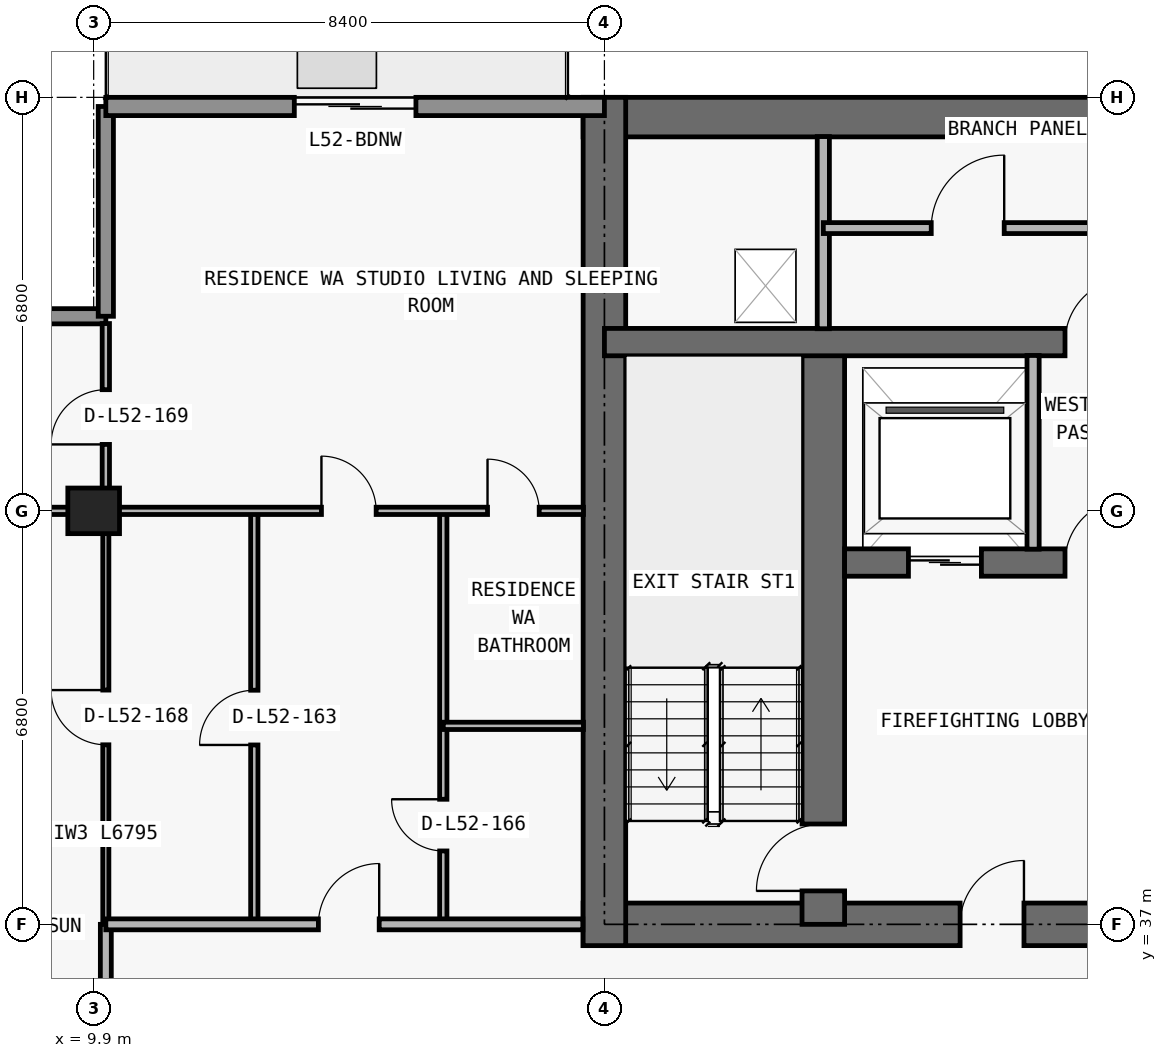
"""IFC4 building model, lengths in metres.
Left out: names, types, materials, properties, quantities, classifications, styles, units other than length and angle.
Written with IfcOpenShell. Run it as: python <this file> out.ifc"""

import sys

from ifc_helpers import new_model, si_unit, direction, frame, frame_2d, origin, origin_2d, place, context, subcontext, project, spatial, rectangle, extrude, element, fill, save


model = new_model("IFC4")
c1 = context("Model", 3, precision=1e-05, world=origin(), true_north=direction((0.0, 1.0)))
c2 = subcontext(c1, "Body", "Model", "MODEL_VIEW")
j1 = project(units=[si_unit("LENGTHUNIT", "METRE"), si_unit("PLANEANGLEUNIT", "RADIAN")], contexts=[c1])
p1 = place(None, origin())
s1 = spatial("IfcSite", under=j1, at=p1, CompositionType="ELEMENT")
p2 = place(p1, origin())
s2 = spatial("IfcBuilding", under=s1, at=p2, CompositionType="ELEMENT")
p3 = place(p2, frame((0.0, 0.0, 188.4)))
s3 = spatial("IfcBuildingStorey", under=s2, at=p3, CompositionType="ELEMENT", Elevation=188.4)
p4 = place(p3, frame((9.9, 43.8, 0.0), z_axis=(0.0, 0.0, 1.0), x_axis=(1.0, 0.0, 0.0)))
e1 = element("IfcColumn", 1, at=p4, inside=s3, PredefinedType="COLUMN", context=c2, shape_type="SweptSolid", body=[
    extrude(rectangle(XDim=0.85, YDim=0.75, at=origin_2d()), origin(), (0.0, 0.0, 1.0), 3.05),
])
p5 = place(p3, frame((17.95, 37.0, 0.0), z_axis=(0.0, 0.0, 1.0), x_axis=(1.0, 0.0, 0.0)))
e2 = element("IfcWall", 2, at=p5, inside=s3, PredefinedType="SHEAR", context=c2, shape_type="SweptSolid", body=[
    extrude(rectangle(XDim=41.9, YDim=0.7, at=frame_2d((20.95, 0.0))), origin(), (0.0, 0.0, 1.0), 3.05),
])
p6 = place(p5, frame((14.35, 0.0, 0.0)))
e3 = element("IfcOpeningElement", 3, at=p6, cuts=e2, PredefinedType="OPENING", context=c2, shape_type="SweptSolid", body=[
    extrude(rectangle(XDim=1.1, YDim=2.15, at=frame_2d((0.55, 1.075))), frame((0.0, 0.36, 0.0), z_axis=(0.0, -1.0, 0.0), x_axis=(1.0, 0.0, 0.0)), (0.0, 0.0, 1.0), 0.72),
])
p7 = place(p5, frame((6.2, 0.0, 0.0)))
e4 = element("IfcOpeningElement", 4, at=p7, cuts=e2, PredefinedType="OPENING", context=c2, shape_type="SweptSolid", body=[
    extrude(rectangle(XDim=1.05, YDim=2.15, at=frame_2d((0.525, 1.075))), frame((0.0, 0.36, 0.0), z_axis=(0.0, -1.0, 0.0), x_axis=(1.0, 0.0, 0.0)), (0.0, 0.0, 1.0), 0.72),
])
p8 = place(p5, frame((34.7, 0.0, 0.0)))
e5 = element("IfcOpeningElement", 5, at=p8, cuts=e2, PredefinedType="OPENING", context=c2, shape_type="SweptSolid", body=[
    extrude(rectangle(XDim=1.05, YDim=2.15, at=frame_2d((0.525, 1.075))), frame((0.0, 0.36, 0.0), z_axis=(0.0, -1.0, 0.0), x_axis=(1.0, 0.0, 0.0)), (0.0, 0.0, 1.0), 0.72),
])
p9 = place(p5, frame((10.812, 0.0, 0.0)))
e6 = element("IfcOpeningElement", 6, at=p9, cuts=e2, PredefinedType="OPENING", context=c2, shape_type="SweptSolid", body=[
    extrude(rectangle(XDim=1.05, YDim=2.15, at=frame_2d((0.525, 1.075))), frame((0.0, 0.36, 0.0), z_axis=(0.0, -1.0, 0.0), x_axis=(1.0, 0.0, 0.0)), (0.0, 0.0, 1.0), 0.72),
])
p10 = place(p5, frame((24.05, 0.0, 0.0)))
e7 = element("IfcOpeningElement", 7, at=p10, cuts=e2, PredefinedType="OPENING", context=c2, shape_type="SweptSolid", body=[
    extrude(rectangle(XDim=1.05, YDim=2.15, at=frame_2d((0.525, 1.075))), frame((0.0, 0.36, 0.0), z_axis=(0.0, -1.0, 0.0), x_axis=(1.0, 0.0, 0.0)), (0.0, 0.0, 1.0), 0.72),
])
p11 = place(p3, frame((17.95, 50.275, 0.0), z_axis=(0.0, 0.0, 1.0), x_axis=(1.0, 0.0, 0.0)))
e8 = element("IfcWall", 8, at=p11, inside=s3, PredefinedType="SHEAR", context=c2, shape_type="SweptSolid", body=[
    extrude(rectangle(XDim=41.9, YDim=0.65, at=frame_2d((20.95, 0.0))), origin(), (0.0, 0.0, 1.0), 3.05),
])
p12 = place(p3, frame((18.3, 36.65, 0.0), z_axis=(0.0, 0.0, 1.0), x_axis=(0.0, 1.0, 0.0)))
e9 = element("IfcWall", 9, at=p12, inside=s3, PredefinedType="SHEAR", context=c2, shape_type="SweptSolid", body=[
    extrude(rectangle(XDim=13.95, YDim=0.7, at=frame_2d((6.975, 0.0))), origin(), (0.0, 0.0, 1.0), 3.05),
])
p13 = place(p3, frame((21.9, 37.0, 0.0), z_axis=(0.0, 0.0, 1.0), x_axis=(0.0, 1.0, 0.0)))
e10 = element("IfcWall", 10, at=p13, inside=s3, PredefinedType="SHEAR", context=c2, shape_type="SweptSolid", body=[
    extrude(rectangle(XDim=9.575, YDim=0.7, at=frame_2d((4.788, 0.0))), origin(), (0.0, 0.0, 1.0), 3.05),
])
p14 = place(p13, frame((0.55, 0.0, 0.0)))
e11 = element("IfcOpeningElement", 11, at=p14, cuts=e10, PredefinedType="OPENING", context=c2, shape_type="SweptSolid", body=[
    extrude(rectangle(XDim=1.1, YDim=2.15, at=frame_2d((0.55, 1.075))), frame((0.0, 0.36, 0.0), z_axis=(0.0, -1.0, 0.0), x_axis=(1.0, 0.0, 0.0)), (0.0, 0.0, 1.0), 0.72),
])
p15 = place(p3, frame((22.25, 42.95, 0.0), z_axis=(0.0, 0.0, 1.0), x_axis=(1.0, 0.0, 0.0)))
e12 = element("IfcWall", 12, at=p15, inside=s3, PredefinedType="SHEAR", context=c2, shape_type="SweptSolid", body=[
    extrude(rectangle(XDim=33.3, YDim=0.45, at=frame_2d((16.65, 0.0))), origin(), (0.0, 0.0, 1.0), 3.05),
])
p16 = place(p15, frame((1.05, 0.0, 0.0)))
e13 = element("IfcOpeningElement", 13, at=p16, cuts=e12, PredefinedType="OPENING", context=c2, shape_type="SweptSolid", body=[
    extrude(rectangle(XDim=1.2, YDim=2.2, at=frame_2d((0.6, 1.1))), frame((0.0, 0.235, 0.0), z_axis=(0.0, -1.0, 0.0), x_axis=(1.0, 0.0, 0.0)), (0.0, 0.0, 1.0), 0.47),
])
p17 = place(p15, frame((31.05, 0.0, 0.0)))
e14 = element("IfcOpeningElement", 14, at=p17, cuts=e12, PredefinedType="OPENING", context=c2, shape_type="SweptSolid", body=[
    extrude(rectangle(XDim=1.2, YDim=2.2, at=frame_2d((0.6, 1.1))), frame((0.0, 0.235, 0.0), z_axis=(0.0, -1.0, 0.0), x_axis=(1.0, 0.0, 0.0)), (0.0, 0.0, 1.0), 0.47),
])
p18 = place(p15, frame((26.45, 0.0, 0.0)))
e15 = element("IfcOpeningElement", 15, at=p18, cuts=e12, PredefinedType="OPENING", context=c2, shape_type="SweptSolid", body=[
    extrude(rectangle(XDim=1.1, YDim=2.2, at=frame_2d((0.55, 1.1))), frame((0.0, 0.235, 0.0), z_axis=(0.0, -1.0, 0.0), x_axis=(1.0, 0.0, 0.0)), (0.0, 0.0, 1.0), 0.47),
])
p19 = place(p15, frame((5.95, 0.0, 0.0)))
e16 = element("IfcOpeningElement", 16, at=p19, cuts=e12, PredefinedType="OPENING", context=c2, shape_type="SweptSolid", body=[
    extrude(rectangle(XDim=1.1, YDim=2.2, at=frame_2d((0.55, 1.1))), frame((0.0, 0.235, 0.0), z_axis=(0.0, -1.0, 0.0), x_axis=(1.0, 0.0, 0.0)), (0.0, 0.0, 1.0), 0.47),
])
p20 = place(p15, frame((3.625, 0.0, 0.0)))
e17 = element("IfcOpeningElement", 17, at=p20, cuts=e12, PredefinedType="OPENING", context=c2, shape_type="SweptSolid", body=[
    extrude(rectangle(XDim=1.05, YDim=2.15, at=frame_2d((0.525, 1.075))), frame((0.0, 0.235, 0.0), z_axis=(0.0, -1.0, 0.0), x_axis=(1.0, 0.0, 0.0)), (0.0, 0.0, 1.0), 0.47),
])
p21 = place(p15, frame((28.675, 0.0, 0.0)))
e18 = element("IfcOpeningElement", 18, at=p21, cuts=e12, PredefinedType="OPENING", context=c2, shape_type="SweptSolid", body=[
    extrude(rectangle(XDim=1.05, YDim=2.15, at=frame_2d((0.525, 1.075))), frame((0.0, 0.235, 0.0), z_axis=(0.0, -1.0, 0.0), x_axis=(1.0, 0.0, 0.0)), (0.0, 0.0, 1.0), 0.47),
])
p22 = place(p15, frame((15.225, 0.0, 0.0)))
e19 = element("IfcOpeningElement", 19, at=p22, cuts=e12, PredefinedType="OPENING", context=c2, shape_type="SweptSolid", body=[
    extrude(rectangle(XDim=1.0, YDim=2.2, at=frame_2d((0.5, 1.1))), frame((0.0, 0.235, 0.0), z_axis=(0.0, -1.0, 0.0), x_axis=(1.0, 0.0, 0.0)), (0.0, 0.0, 1.0), 0.47),
])
p23 = place(p15, frame((21.975, 0.0, 0.0)))
e20 = element("IfcOpeningElement", 20, at=p23, cuts=e12, PredefinedType="OPENING", context=c2, shape_type="SweptSolid", body=[
    extrude(rectangle(XDim=1.0, YDim=2.2, at=frame_2d((0.5, 1.1))), frame((0.0, 0.235, 0.0), z_axis=(0.0, -1.0, 0.0), x_axis=(1.0, 0.0, 0.0)), (0.0, 0.0, 1.0), 0.47),
])
p24 = place(p3, frame((18.3, 46.575, 0.0), z_axis=(0.0, 0.0, 1.0), x_axis=(1.0, 0.0, 0.0)))
e21 = element("IfcWall", 21, at=p24, inside=s3, PredefinedType="SHEAR", context=c2, shape_type="SweptSolid", body=[
    extrude(rectangle(XDim=41.2, YDim=0.45, at=frame_2d((20.6, 0.0))), origin(), (0.0, 0.0, 1.0), 3.05),
])
p25 = place(p24, frame((7.575, 0.0, 0.0)))
e22 = element("IfcOpeningElement", 22, at=p25, cuts=e21, PredefinedType="OPENING", context=c2, shape_type="SweptSolid", body=[
    extrude(rectangle(XDim=1.05, YDim=2.15, at=frame_2d((0.525, 1.075))), frame((0.0, 0.235, 0.0), z_axis=(0.0, -1.0, 0.0), x_axis=(1.0, 0.0, 0.0)), (0.0, 0.0, 1.0), 0.47),
])
p26 = place(p24, frame((32.625, 0.0, 0.0)))
e23 = element("IfcOpeningElement", 23, at=p26, cuts=e21, PredefinedType="OPENING", context=c2, shape_type="SweptSolid", body=[
    extrude(rectangle(XDim=1.05, YDim=2.15, at=frame_2d((0.525, 1.075))), frame((0.0, 0.235, 0.0), z_axis=(0.0, -1.0, 0.0), x_axis=(1.0, 0.0, 0.0)), (0.0, 0.0, 1.0), 0.47),
])
p27 = place(p3, frame((6.25, 47.0, 0.0), z_axis=(0.0, 0.0, 1.0), x_axis=(1.0, 0.0, 0.0)))
e24 = element("IfcWall", 24, at=p27, inside=s3, PredefinedType="ELEMENTEDWALL", context=c2, shape_type="SweptSolid", body=[
    extrude(rectangle(XDim=3.85, YDim=0.25, at=frame_2d((1.925, 0.0))), origin(), (0.0, 0.0, 1.0), 3.05),
])
p28 = place(p3, frame((10.1, 47.0, 0.0), z_axis=(0.0, 0.0, 1.0), x_axis=(0.0, 1.0, 0.0)))
e25 = element("IfcWall", 25, at=p28, inside=s3, PredefinedType="ELEMENTEDWALL", context=c2, shape_type="SweptSolid", body=[
    extrude(rectangle(XDim=3.45, YDim=0.25, at=frame_2d((1.725, 0.0))), origin(), (0.0, 0.0, 1.0), 3.05),
])
p29 = place(p3, frame((10.1, 50.45, 0.0), z_axis=(0.0, 0.0, 1.0), x_axis=(1.0, 0.0, 0.0)))
e26 = element("IfcWall", 26, at=p29, inside=s3, PredefinedType="STANDARD", context=c2, shape_type="SweptSolid", body=[
    extrude(rectangle(XDim=8.2, YDim=0.3, at=frame_2d((4.1, 0.0))), origin(), (0.0, 0.0, 1.0), 3.05),
])
p30 = place(p29, frame((3.1, 0.0, 0.0)))
e27 = element("IfcOpeningElement", 27, at=p30, cuts=e26, PredefinedType="OPENING", context=c2, shape_type="SweptSolid", body=[
    extrude(rectangle(XDim=2.0, YDim=2.3, at=frame_2d((1.0, 1.15))), frame((0.0, 0.16, 0.0), z_axis=(0.0, -1.0, 0.0), x_axis=(1.0, 0.0, 0.0)), (0.0, 0.0, 1.0), 0.32),
])
p31 = place(p3, frame((10.1, 33.505, 0.0), z_axis=(0.0, 0.0, 1.0), x_axis=(0.0, 1.0, 0.0)))
e28 = element("IfcWall", 28, at=p31, inside=s3, PredefinedType="PARTITIONING", context=c2, shape_type="SweptSolid", body=[
    extrude(rectangle(XDim=3.495, YDim=0.18, at=frame_2d((1.748, 0.0))), origin(), (0.0, 0.0, 1.0), 2.263),
])
p32 = place(p3, frame((10.1, 37.005, 0.0), z_axis=(0.0, 0.0, 1.0), x_axis=(0.0, 1.0, 0.0)))
e29 = element("IfcWall", 29, at=p32, inside=s3, PredefinedType="MOVABLE", context=c2, shape_type="SweptSolid", body=[
    extrude(rectangle(XDim=6.795, YDim=0.1, at=frame_2d((3.397, 0.0))), origin(), (0.0, 0.0, 1.0), 2.263),
])
p33 = place(p32, frame((2.948, 0.0, 0.0)))
e30 = element("IfcOpeningElement", 30, at=p33, cuts=e29, PredefinedType="OPENING", context=c2, shape_type="SweptSolid", body=[
    extrude(rectangle(XDim=0.9, YDim=2.15, at=frame_2d((0.45, 1.075))), frame((0.0, 0.06, 0.0), z_axis=(0.0, -1.0, 0.0), x_axis=(1.0, 0.0, 0.0)), (0.0, 0.0, 1.0), 0.12),
])
p34 = place(p3, frame((10.1, 43.805, 0.0), z_axis=(0.0, 0.0, 1.0), x_axis=(0.0, 1.0, 0.0)))
e31 = element("IfcWall", 31, at=p34, inside=s3, PredefinedType="PARTITIONING", context=c2, shape_type="SweptSolid", body=[
    extrude(rectangle(XDim=3.075, YDim=0.12, at=frame_2d((1.538, 0.0))), origin(), (0.0, 0.0, 1.0), 3.05),
])
p35 = place(p34, frame((1.087, 0.0, 0.0)))
e32 = element("IfcOpeningElement", 32, at=p35, cuts=e31, PredefinedType="OPENING", context=c2, shape_type="SweptSolid", body=[
    extrude(rectangle(XDim=0.9, YDim=2.15, at=frame_2d((0.45, 1.075))), frame((0.0, 0.07, 0.0), z_axis=(0.0, -1.0, 0.0), x_axis=(1.0, 0.0, 0.0)), (0.0, 0.0, 1.0), 0.14),
])
p36 = place(p3, frame((12.542, 37.0, 0.0), z_axis=(0.0, 0.0, 1.0), x_axis=(0.0, 1.0, 0.0)))
e33 = element("IfcWall", 33, at=p36, inside=s3, PredefinedType="PARTITIONING", context=c2, shape_type="SweptSolid", body=[
    extrude(rectangle(XDim=6.8, YDim=0.12, at=frame_2d((3.4, 0.0))), origin(), (0.0, 0.0, 1.0), 2.578),
])
p37 = place(p36, frame((2.95, 0.0, 0.0)))
e34 = element("IfcOpeningElement", 34, at=p37, cuts=e33, PredefinedType="OPENING", context=c2, shape_type="SweptSolid", body=[
    extrude(rectangle(XDim=0.9, YDim=2.15, at=frame_2d((0.45, 1.075))), frame((0.0, 0.07, 0.0), z_axis=(0.0, -1.0, 0.0), x_axis=(1.0, 0.0, 0.0)), (0.0, 0.0, 1.0), 0.14),
])
p38 = place(p3, frame((15.65, 37.0, 0.0), z_axis=(0.0, 0.0, 1.0), x_axis=(0.0, 1.0, 0.0)))
e35 = element("IfcWall", 35, at=p38, inside=s3, PredefinedType="PARTITIONING", context=c2, shape_type="SweptSolid", body=[
    extrude(rectangle(XDim=6.8, YDim=0.12, at=frame_2d((3.4, 0.0))), origin(), (0.0, 0.0, 1.0), 2.679),
])
p39 = place(p38, frame((1.207, 0.0, 0.0)))
e36 = element("IfcOpeningElement", 36, at=p39, cuts=e35, PredefinedType="OPENING", context=c2, shape_type="SweptSolid", body=[
    extrude(rectangle(XDim=0.85, YDim=2.1, at=frame_2d((0.425, 1.05))), frame((0.0, 0.07, 0.0), z_axis=(0.0, -1.0, 0.0), x_axis=(1.0, 0.0, 0.0)), (0.0, 0.0, 1.0), 0.14),
])
p40 = place(p3, frame((21.9, 46.795, 0.0), z_axis=(0.0, 0.0, 1.0), x_axis=(0.0, 1.0, 0.0)))
e37 = element("IfcWall", 37, at=p40, inside=s3, PredefinedType="PARTITIONING", context=c2, shape_type="SweptSolid", body=[
    extrude(rectangle(XDim=3.16, YDim=0.2, at=frame_2d((1.58, 0.0))), origin(), (0.0, 0.0, 1.0), 3.05),
])
p41 = place(p3, frame((25.35, 43.17, 0.0), z_axis=(0.0, 0.0, 1.0), x_axis=(0.0, 1.0, 0.0)))
e38 = element("IfcWall", 38, at=p41, inside=s3, PredefinedType="PARTITIONING", context=c2, shape_type="SweptSolid", body=[
    extrude(rectangle(XDim=3.185, YDim=0.2, at=frame_2d((1.593, 0.0))), origin(), (0.0, 0.0, 1.0), 3.05),
])
p42 = place(p3, frame((10.1, 37.0, 0.0), z_axis=(0.0, 0.0, 1.0), x_axis=(1.0, 0.0, 0.0)))
e39 = element("IfcWall", 39, at=p42, inside=s3, PredefinedType="PARTITIONING", context=c2, shape_type="SweptSolid", body=[
    extrude(rectangle(XDim=7.845, YDim=0.18, at=frame_2d((3.922, 0.0))), origin(), (0.0, 0.0, 1.0), 3.05),
])
p43 = place(p42, frame((3.496, 0.0, 0.0)))
e40 = element("IfcOpeningElement", 40, at=p43, cuts=e39, PredefinedType="OPENING", context=c2, shape_type="SweptSolid", body=[
    extrude(rectangle(XDim=1.0, YDim=2.2, at=frame_2d((0.5, 1.1))), frame((0.0, 0.1, 0.0), z_axis=(0.0, -1.0, 0.0), x_axis=(1.0, 0.0, 0.0)), (0.0, 0.0, 1.0), 0.2),
])
p44 = place(p3, frame((15.65, 40.264, 0.0), z_axis=(0.0, 0.0, 1.0), x_axis=(1.0, 0.0, 0.0)))
e41 = element("IfcWall", 41, at=p44, inside=s3, PredefinedType="PARTITIONING", context=c2, shape_type="SweptSolid", body=[
    extrude(rectangle(XDim=2.305, YDim=0.12, at=frame_2d((1.153, 0.0))), origin(), (0.0, 0.0, 1.0), 3.05),
])
p45 = place(p3, frame((6.395, 43.8, 0.0), z_axis=(0.0, 0.0, 1.0), x_axis=(1.0, 0.0, 0.0)))
e42 = element("IfcWall", 42, at=p45, inside=s3, PredefinedType="PARTITIONING", context=c2, shape_type="SweptSolid", body=[
    extrude(rectangle(XDim=11.56, YDim=0.12, at=frame_2d((5.78, 0.0))), origin(), (0.0, 0.0, 1.0), 2.418),
])
p46 = place(p45, frame((7.251, 0.0, 0.0)))
e43 = element("IfcOpeningElement", 43, at=p46, cuts=e42, PredefinedType="OPENING", context=c2, shape_type="SweptSolid", body=[
    extrude(rectangle(XDim=0.9, YDim=2.15, at=frame_2d((0.45, 1.075))), frame((0.0, 0.07, 0.0), z_axis=(0.0, -1.0, 0.0), x_axis=(1.0, 0.0, 0.0)), (0.0, 0.0, 1.0), 0.14),
])
p47 = place(p45, frame((9.982, 0.0, 0.0)))
e44 = element("IfcOpeningElement", 44, at=p47, cuts=e42, PredefinedType="OPENING", context=c2, shape_type="SweptSolid", body=[
    extrude(rectangle(XDim=0.85, YDim=2.1, at=frame_2d((0.425, 1.05))), frame((0.0, 0.07, 0.0), z_axis=(0.0, -1.0, 0.0), x_axis=(1.0, 0.0, 0.0)), (0.0, 0.0, 1.0), 0.14),
])
p48 = place(p3, frame((21.9, 48.45, 0.0), z_axis=(0.0, 0.0, 1.0), x_axis=(1.0, 0.0, 0.0)))
e45 = element("IfcWall", 45, at=p48, inside=s3, PredefinedType="PARTITIONING", context=c2, shape_type="SweptSolid", body=[
    extrude(rectangle(XDim=4.75, YDim=0.18, at=frame_2d((2.375, 0.0))), origin(), (0.0, 0.0, 1.0), 3.05),
])
p49 = place(p48, frame((1.775, 0.0, 0.0)))
e46 = element("IfcOpeningElement", 46, at=p49, cuts=e45, PredefinedType="OPENING", context=c2, shape_type="SweptSolid", body=[
    extrude(rectangle(XDim=1.2, YDim=2.2, at=frame_2d((0.6, 1.1))), frame((0.0, 0.1, 0.0), z_axis=(0.0, -1.0, 0.0), x_axis=(1.0, 0.0, 0.0)), (0.0, 0.0, 1.0), 0.2),
])
p50 = place(p30, origin())
e47 = element("IfcDoor", 47, at=p50, inside=s3, OperationType="DOUBLE_DOOR_SLIDING", PredefinedType="DOOR", context=c2, shape_type="SweptSolid", body=[
    extrude(rectangle(XDim=2.0, YDim=2.3, at=frame_2d((1.0, 1.15))), frame((0.0, 0.025, 0.0), z_axis=(0.0, -1.0, 0.0), x_axis=(1.0, 0.0, 0.0)), (0.0, 0.0, 1.0), 0.05),
])
fill(e27, e47)
p51 = place(p16, origin())
e48 = element("IfcDoor", 48, at=p51, inside=s3, OperationType="DOUBLE_DOOR_SLIDING", PredefinedType="DOOR", context=c2, shape_type="SweptSolid", body=[
    extrude(rectangle(XDim=1.2, YDim=2.2, at=frame_2d((0.6, 1.1))), frame((0.0, 0.025, 0.0), z_axis=(0.0, -1.0, 0.0), x_axis=(1.0, 0.0, 0.0)), (0.0, 0.0, 1.0), 0.05),
])
fill(e13, e48)
p52 = place(p7, origin())
e49 = element("IfcDoor", 49, at=p52, inside=s3, OperationType="SINGLE_SWING_RIGHT", PredefinedType="DOOR", context=c2, shape_type="SweptSolid", body=[
    extrude(rectangle(XDim=1.05, YDim=2.15, at=frame_2d((0.525, 1.075))), frame((0.0, 0.025, 0.0), z_axis=(0.0, -1.0, 0.0), x_axis=(1.0, 0.0, 0.0)), (0.0, 0.0, 1.0), 0.05),
])
fill(e4, e49)
p53 = place(p14, origin())
e50 = element("IfcDoor", 50, at=p53, inside=s3, OperationType="SINGLE_SWING_LEFT", PredefinedType="DOOR", context=c2, shape_type="SweptSolid", body=[
    extrude(rectangle(XDim=1.1, YDim=2.15, at=frame_2d((0.55, 1.075))), frame((0.0, 0.025, 0.0), z_axis=(0.0, -1.0, 0.0), x_axis=(1.0, 0.0, 0.0)), (0.0, 0.0, 1.0), 0.05),
])
fill(e11, e50)
p54 = place(p20, origin())
e51 = element("IfcDoor", 51, at=p54, inside=s3, OperationType="SINGLE_SWING_RIGHT", PredefinedType="DOOR", context=c2, shape_type="SweptSolid", body=[
    extrude(rectangle(XDim=1.05, YDim=2.15, at=frame_2d((0.525, 1.075))), frame((0.0, 0.025, 0.0), z_axis=(0.0, -1.0, 0.0), x_axis=(1.0, 0.0, 0.0)), (0.0, 0.0, 1.0), 0.05),
])
fill(e17, e51)
p55 = place(p25, origin())
e52 = element("IfcDoor", 52, at=p55, inside=s3, OperationType="SINGLE_SWING_RIGHT", PredefinedType="DOOR", context=c2, shape_type="SweptSolid", body=[
    extrude(rectangle(XDim=1.05, YDim=2.15, at=frame_2d((0.525, 1.075))), frame((0.0, 0.025, 0.0), z_axis=(0.0, -1.0, 0.0), x_axis=(1.0, 0.0, 0.0)), (0.0, 0.0, 1.0), 0.05),
])
fill(e22, e52)
p56 = place(p49, origin())
e53 = element("IfcDoor", 53, at=p56, inside=s3, OperationType="SINGLE_SWING_RIGHT", PredefinedType="DOOR", context=c2, shape_type="SweptSolid", body=[
    extrude(rectangle(XDim=1.2, YDim=2.2, at=frame_2d((0.6, 1.1))), frame((0.0, 0.025, 0.0), z_axis=(0.0, -1.0, 0.0), x_axis=(1.0, 0.0, 0.0)), (0.0, 0.0, 1.0), 0.05),
])
fill(e46, e53)
p57 = place(p37, origin())
e54 = element("IfcDoor", 54, at=p57, inside=s3, OperationType="SINGLE_SWING_LEFT", PredefinedType="DOOR", context=c2, shape_type="SweptSolid", body=[
    extrude(rectangle(XDim=0.9, YDim=2.15, at=frame_2d((0.45, 1.075))), frame((0.0, 0.025, 0.0), z_axis=(0.0, -1.0, 0.0), x_axis=(1.0, 0.0, 0.0)), (0.0, 0.0, 1.0), 0.05),
])
fill(e34, e54)
p58 = place(p43, origin())
e55 = element("IfcDoor", 55, at=p58, inside=s3, OperationType="SINGLE_SWING_RIGHT", PredefinedType="DOOR", context=c2, shape_type="SweptSolid", body=[
    extrude(rectangle(XDim=1.0, YDim=2.2, at=frame_2d((0.5, 1.1))), frame((0.0, 0.025, 0.0), z_axis=(0.0, -1.0, 0.0), x_axis=(1.0, 0.0, 0.0)), (0.0, 0.0, 1.0), 0.05),
])
fill(e40, e55)
p59 = place(p46, origin())
e56 = element("IfcDoor", 56, at=p59, inside=s3, OperationType="SINGLE_SWING_LEFT", PredefinedType="DOOR", context=c2, shape_type="SweptSolid", body=[
    extrude(rectangle(XDim=0.9, YDim=2.15, at=frame_2d((0.45, 1.075))), frame((0.0, 0.025, 0.0), z_axis=(0.0, -1.0, 0.0), x_axis=(1.0, 0.0, 0.0)), (0.0, 0.0, 1.0), 0.05),
])
fill(e43, e56)
p60 = place(p39, origin())
e57 = element("IfcDoor", 57, at=p60, inside=s3, OperationType="SINGLE_SWING_RIGHT", PredefinedType="DOOR", context=c2, shape_type="SweptSolid", body=[
    extrude(rectangle(XDim=0.85, YDim=2.1, at=frame_2d((0.425, 1.05))), frame((0.0, 0.025, 0.0), z_axis=(0.0, -1.0, 0.0), x_axis=(1.0, 0.0, 0.0)), (0.0, 0.0, 1.0), 0.05),
])
fill(e36, e57)
p61 = place(p47, origin())
e58 = element("IfcDoor", 58, at=p61, inside=s3, OperationType="SINGLE_SWING_LEFT", PredefinedType="DOOR", context=c2, shape_type="SweptSolid", body=[
    extrude(rectangle(XDim=0.85, YDim=2.1, at=frame_2d((0.425, 1.05))), frame((0.0, 0.025, 0.0), z_axis=(0.0, -1.0, 0.0), x_axis=(1.0, 0.0, 0.0)), (0.0, 0.0, 1.0), 0.05),
])
fill(e44, e58)
p62 = place(p33, origin())
e59 = element("IfcDoor", 59, at=p62, inside=s3, OperationType="SINGLE_SWING_RIGHT", PredefinedType="DOOR", context=c2, shape_type="SweptSolid", body=[
    extrude(rectangle(XDim=0.9, YDim=2.15, at=frame_2d((0.45, 1.075))), frame((0.0, 0.025, 0.0), z_axis=(0.0, -1.0, 0.0), x_axis=(1.0, 0.0, 0.0)), (0.0, 0.0, 1.0), 0.05),
])
fill(e30, e59)
p63 = place(p35, origin())
e60 = element("IfcDoor", 60, at=p63, inside=s3, OperationType="SINGLE_SWING_LEFT", PredefinedType="DOOR", context=c2, shape_type="SweptSolid", body=[
    extrude(rectangle(XDim=0.9, YDim=2.15, at=frame_2d((0.45, 1.075))), frame((0.0, 0.025, 0.0), z_axis=(0.0, -1.0, 0.0), x_axis=(1.0, 0.0, 0.0)), (0.0, 0.0, 1.0), 0.05),
])
fill(e32, e60)
save(model, sys.argv[1])
